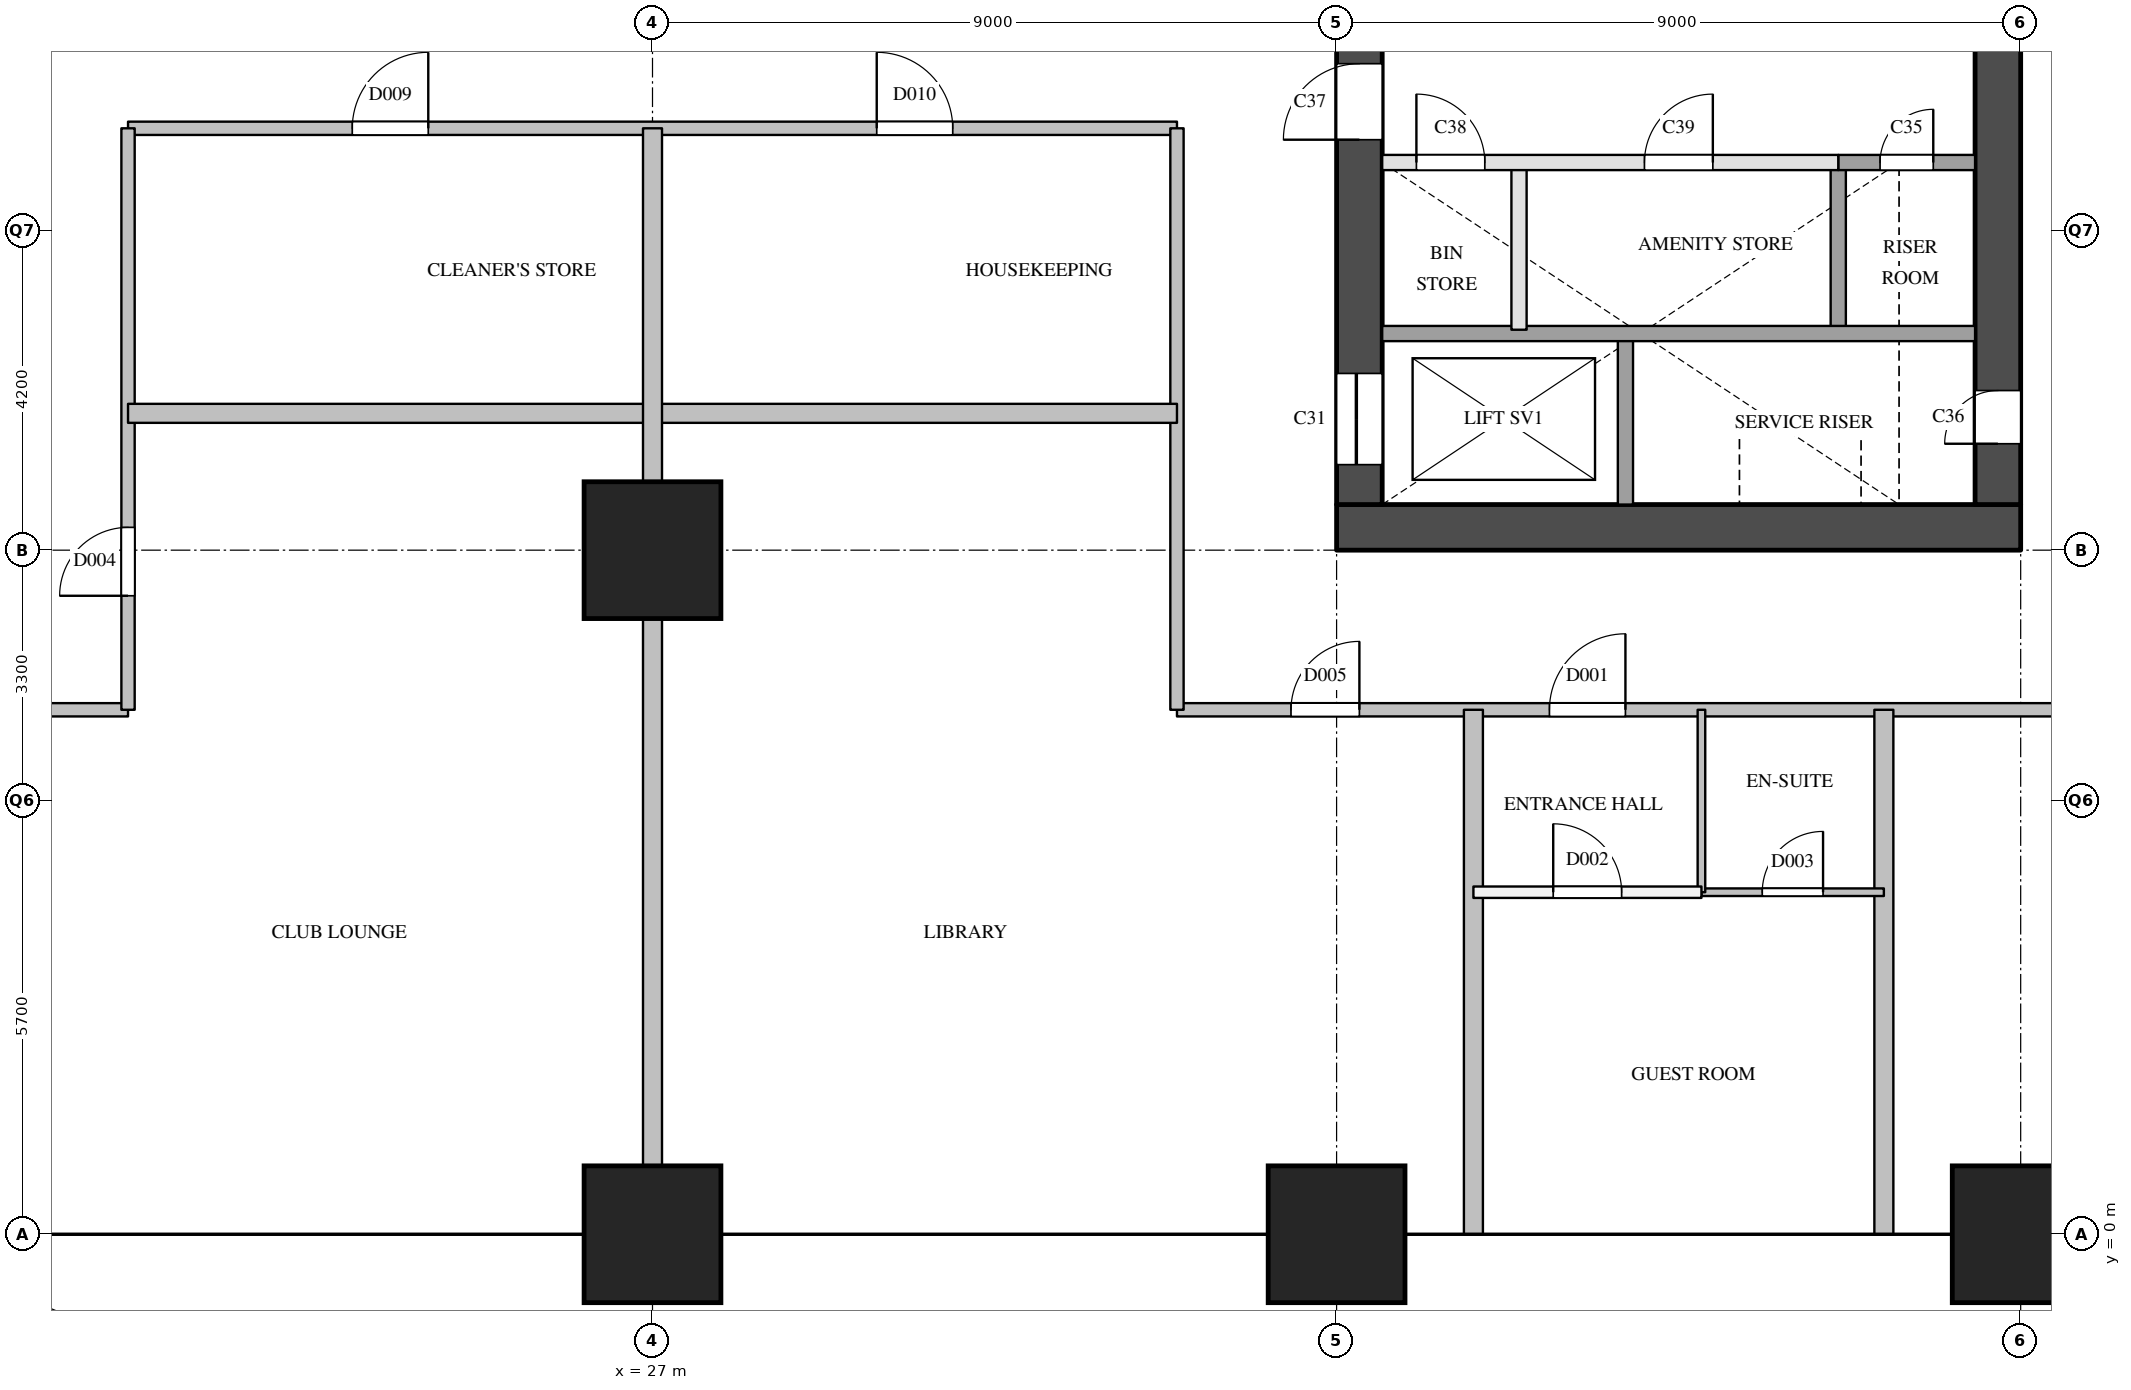
"""IFC4 building model, lengths in metres.
Left out: names, types, materials, properties, quantities, classifications, styles, units other than length and angle.
Written with IfcOpenShell. Run it as: python <this file> out.ifc"""

import sys

from ifc_helpers import new_model, si_unit, direction, frame, frame_2d, origin, origin_2d, place, context, subcontext, project, spatial, rectangle, extrude, element, fill, save


model = new_model("IFC4")
c1 = context("Model", 3, precision=1e-05, world=origin(), true_north=direction((0.0, 1.0)))
c2 = subcontext(c1, "Body", "Model", "MODEL_VIEW")
j1 = project(units=[si_unit("LENGTHUNIT", "METRE"), si_unit("PLANEANGLEUNIT", "RADIAN")], contexts=[c1])
p1 = place(None, origin())
s1 = spatial("IfcSite", under=j1, at=p1, CompositionType="ELEMENT")
p2 = place(p1, origin())
s2 = spatial("IfcBuilding", under=s1, at=p2, CompositionType="ELEMENT")
p3 = place(p2, frame((0.0, 0.0, 53.8)))
s3 = spatial("IfcBuildingStorey", under=s2, at=p3, CompositionType="ELEMENT", Elevation=53.8)
for number, where, z_axis, x_axis in (
    (1, (27.0, 0.0, 0.0), (0.0, 0.0, 1.0), (1.0, 0.0, 0.0)),
    (2, (27.0, 9.0, 0.0), (0.0, 0.0, 1.0), (1.0, 0.0, 0.0)),
    (3, (36.0, 0.0, 0.0), (0.0, 0.0, 1.0), (1.0, 0.0, 0.0)),
    (4, (45.0, 0.0, 0.0), (0.0, 0.0, 1.0), (1.0, 0.0, 0.0)),
):
    element("IfcColumn", number, at=place(p3, frame(where, z_axis=z_axis, x_axis=x_axis)), inside=s3, PredefinedType="COLUMN", context=c2, shape_type="SweptSolid", body=[
        extrude(rectangle(XDim=1.8, YDim=1.8, at=origin_2d()), origin(), (0.0, 0.0, 1.0), 3.8),
    ])
p4 = place(p3, frame((36.0, 9.3, 0.0), z_axis=(0.0, 0.0, 1.0), x_axis=(1.0, 0.0, 0.0)))
e5 = element("IfcWall", 5, at=p4, inside=s3, PredefinedType="SHEAR", context=c2, shape_type="SweptSolid", body=[
    extrude(rectangle(XDim=9.0, YDim=0.6, at=frame_2d((4.5, 0.0))), origin(), (0.0, 0.0, 1.0), 3.5),
])
p5 = place(p3, frame((36.3, 9.6, 0.0), z_axis=(0.0, 0.0, 1.0), x_axis=(0.0, 1.0, 0.0)))
e6 = element("IfcWall", 6, at=p5, inside=s3, PredefinedType="SHEAR", context=c2, shape_type="SweptSolid", body=[
    extrude(rectangle(XDim=12.3, YDim=0.6, at=frame_2d((6.15, 0.0))), origin(), (0.0, 0.0, 1.0), 3.5),
])
p6 = place(p5, frame((0.525, 0.0, 0.0)))
e7 = element("IfcOpeningElement", 7, at=p6, cuts=e6, PredefinedType="OPENING", context=c2, shape_type="SweptSolid", body=[
    extrude(rectangle(XDim=1.2, YDim=2.1, at=frame_2d((0.6, 1.05))), frame((0.0, 0.31, 0.0), z_axis=(0.0, -1.0, 0.0), x_axis=(1.0, 0.0, 0.0)), (0.0, 0.0, 1.0), 0.62),
])
p7 = place(p5, frame((4.8, 0.0, 0.0)))
e8 = element("IfcOpeningElement", 8, at=p7, cuts=e6, PredefinedType="OPENING", context=c2, shape_type="SweptSolid", body=[
    extrude(rectangle(XDim=1.0, YDim=2.1, at=frame_2d((0.5, 1.05))), frame((0.0, 0.31, 0.0), z_axis=(0.0, -1.0, 0.0), x_axis=(1.0, 0.0, 0.0)), (0.0, 0.0, 1.0), 0.62),
])
p8 = place(p3, frame((44.7, 9.6, 0.0), z_axis=(0.0, 0.0, 1.0), x_axis=(0.0, 1.0, 0.0)))
e9 = element("IfcWall", 9, at=p8, inside=s3, PredefinedType="SHEAR", context=c2, shape_type="SweptSolid", body=[
    extrude(rectangle(XDim=12.3, YDim=0.6, at=frame_2d((6.15, 0.0))), origin(), (0.0, 0.0, 1.0), 3.5),
])
p9 = place(p8, frame((0.8, 0.0, 0.0)))
e10 = element("IfcOpeningElement", 10, at=p9, cuts=e9, PredefinedType="OPENING", context=c2, shape_type="SweptSolid", body=[
    extrude(rectangle(XDim=0.7, YDim=2.1, at=frame_2d((0.35, 1.05))), frame((0.0, 0.31, 0.0), z_axis=(0.0, -1.0, 0.0), x_axis=(1.0, 0.0, 0.0)), (0.0, 0.0, 1.0), 0.62),
])
p10 = place(p3, frame((38.4, 11.9, 0.0), z_axis=(0.0, 0.0, 1.0), x_axis=(0.0, 1.0, 0.0)))
e11 = element("IfcWall", 11, at=p10, inside=s3, PredefinedType="PARTITIONING", context=c2, shape_type="SweptSolid", body=[
    extrude(rectangle(XDim=2.2, YDim=0.2, at=frame_2d((1.1, 0.0))), origin(), (0.0, 0.0, 1.0), 3.5),
])
p11 = place(p3, frame((39.8, 9.6, 0.0), z_axis=(0.0, 0.0, 1.0), x_axis=(0.0, 1.0, 0.0)))
e12 = element("IfcWall", 12, at=p11, inside=s3, PredefinedType="SOLIDWALL", context=c2, shape_type="SweptSolid", body=[
    extrude(rectangle(XDim=2.3, YDim=0.2, at=frame_2d((1.15, 0.0))), origin(), (0.0, 0.0, 1.0), 3.5),
])
p12 = place(p3, frame((42.6, 11.9, 0.0), z_axis=(0.0, 0.0, 1.0), x_axis=(0.0, 1.0, 0.0)))
e13 = element("IfcWall", 13, at=p12, inside=s3, PredefinedType="SOLIDWALL", context=c2, shape_type="SweptSolid", body=[
    extrude(rectangle(XDim=2.2, YDim=0.2, at=frame_2d((1.1, 0.0))), origin(), (0.0, 0.0, 1.0), 3.5),
])
p13 = place(p3, frame((36.6, 11.85, 0.0), z_axis=(0.0, 0.0, 1.0), x_axis=(1.0, 0.0, 0.0)))
e14 = element("IfcWall", 14, at=p13, inside=s3, PredefinedType="SOLIDWALL", context=c2, shape_type="SweptSolid", body=[
    extrude(rectangle(XDim=7.8, YDim=0.2, at=frame_2d((3.9, 0.0))), origin(), (0.0, 0.0, 1.0), 3.5),
])
p14 = place(p3, frame((36.6, 14.1, 0.0), z_axis=(0.0, 0.0, 1.0), x_axis=(1.0, 0.0, 0.0)))
e15 = element("IfcWall", 15, at=p14, inside=s3, PredefinedType="PARTITIONING", context=c2, shape_type="SweptSolid", body=[
    extrude(rectangle(XDim=6.0, YDim=0.2, at=frame_2d((3.0, 0.0))), origin(), (0.0, 0.0, 1.0), 3.5),
])
p15 = place(p14, frame((0.45, 0.0, 0.0)))
e16 = element("IfcOpeningElement", 16, at=p15, cuts=e15, PredefinedType="OPENING", context=c2, shape_type="SweptSolid", body=[
    extrude(rectangle(XDim=0.9, YDim=2.1, at=frame_2d((0.45, 1.05))), frame((0.0, 0.11, 0.0), z_axis=(0.0, -1.0, 0.0), x_axis=(1.0, 0.0, 0.0)), (0.0, 0.0, 1.0), 0.22),
])
p16 = place(p14, frame((3.45, 0.0, 0.0)))
e17 = element("IfcOpeningElement", 17, at=p16, cuts=e15, PredefinedType="OPENING", context=c2, shape_type="SweptSolid", body=[
    extrude(rectangle(XDim=0.9, YDim=2.1, at=frame_2d((0.45, 1.05))), frame((0.0, 0.11, 0.0), z_axis=(0.0, -1.0, 0.0), x_axis=(1.0, 0.0, 0.0)), (0.0, 0.0, 1.0), 0.22),
])
p17 = place(p3, frame((42.6, 14.1, 0.0), z_axis=(0.0, 0.0, 1.0), x_axis=(1.0, 0.0, 0.0)))
e18 = element("IfcWall", 18, at=p17, inside=s3, PredefinedType="SOLIDWALL", context=c2, shape_type="SweptSolid", body=[
    extrude(rectangle(XDim=1.8, YDim=0.2, at=frame_2d((0.9, 0.0))), origin(), (0.0, 0.0, 1.0), 3.5),
])
p18 = place(p17, frame((0.55, 0.0, 0.0)))
e19 = element("IfcOpeningElement", 19, at=p18, cuts=e18, PredefinedType="OPENING", context=c2, shape_type="SweptSolid", body=[
    extrude(rectangle(XDim=0.7, YDim=2.1, at=frame_2d((0.35, 1.05))), frame((0.0, 0.11, 0.0), z_axis=(0.0, -1.0, 0.0), x_axis=(1.0, 0.0, 0.0)), (0.0, 0.0, 1.0), 0.22),
])
p19 = place(p3, frame((6.9, 6.9, 0.0), z_axis=(0.0, 0.0, 1.0), x_axis=(1.0, 0.0, 0.0)))
e20 = element("IfcWall", 20, at=p19, inside=s3, PredefinedType="PARTITIONING", context=c2, shape_type="SweptSolid", body=[
    extrude(rectangle(XDim=13.2, YDim=0.175, at=frame_2d((6.6, 0.0))), origin(), (0.0, 0.0, 1.0), 3.5),
])
p20 = place(p19, frame((6.1, 0.0, 0.0)))
e21 = element("IfcOpeningElement", 21, at=p20, cuts=e20, PredefinedType="OPENING", context=c2, shape_type="SweptSolid", body=[
    extrude(rectangle(XDim=1.0, YDim=2.1, at=frame_2d((0.5, 1.05))), frame((0.0, 0.097, 0.0), z_axis=(0.0, -1.0, 0.0), x_axis=(1.0, 0.0, 0.0)), (0.0, 0.0, 1.0), 0.195),
])
p21 = place(p3, frame((33.9, 6.9, 0.0), z_axis=(0.0, 0.0, 1.0), x_axis=(1.0, 0.0, 0.0)))
e22 = element("IfcWall", 22, at=p21, inside=s3, PredefinedType="PARTITIONING", context=c2, shape_type="SweptSolid", body=[
    extrude(rectangle(XDim=13.2, YDim=0.175, at=frame_2d((6.6, 0.0))), origin(), (0.0, 0.0, 1.0), 3.5),
])
p22 = place(p21, frame((4.9, 0.0, 0.0)))
e23 = element("IfcOpeningElement", 23, at=p22, cuts=e22, PredefinedType="OPENING", context=c2, shape_type="SweptSolid", body=[
    extrude(rectangle(XDim=1.0, YDim=2.1, at=frame_2d((0.5, 1.05))), frame((0.0, 0.097, 0.0), z_axis=(0.0, -1.0, 0.0), x_axis=(1.0, 0.0, 0.0)), (0.0, 0.0, 1.0), 0.195),
])
p23 = place(p21, frame((1.5, 0.0, 0.0)))
e24 = element("IfcOpeningElement", 24, at=p23, cuts=e22, PredefinedType="OPENING", context=c2, shape_type="SweptSolid", body=[
    extrude(rectangle(XDim=0.9, YDim=2.1, at=frame_2d((0.45, 1.05))), frame((0.0, 0.097, 0.0), z_axis=(0.0, -1.0, 0.0), x_axis=(1.0, 0.0, 0.0)), (0.0, 0.0, 1.0), 0.195),
])
p24 = place(p3, frame((20.1, 14.55, 0.0), z_axis=(0.0, 0.0, 1.0), x_axis=(1.0, 0.0, 0.0)))
e25 = element("IfcWall", 25, at=p24, inside=s3, PredefinedType="PARTITIONING", context=c2, shape_type="SweptSolid", body=[
    extrude(rectangle(XDim=13.8, YDim=0.175, at=frame_2d((6.9, 0.0))), origin(), (0.0, 0.0, 1.0), 2.5),
])
p25 = place(p24, frame((2.95, 0.0, 0.0)))
e26 = element("IfcOpeningElement", 26, at=p25, cuts=e25, PredefinedType="OPENING", context=c2, shape_type="SweptSolid", body=[
    extrude(rectangle(XDim=1.0, YDim=2.1, at=frame_2d((0.5, 1.05))), frame((0.0, 0.097, 0.0), z_axis=(0.0, -1.0, 0.0), x_axis=(1.0, 0.0, 0.0)), (0.0, 0.0, 1.0), 0.195),
])
p26 = place(p24, frame((9.85, 0.0, 0.0)))
e27 = element("IfcOpeningElement", 27, at=p26, cuts=e25, PredefinedType="OPENING", context=c2, shape_type="SweptSolid", body=[
    extrude(rectangle(XDim=1.0, YDim=2.1, at=frame_2d((0.5, 1.05))), frame((0.0, 0.097, 0.0), z_axis=(0.0, -1.0, 0.0), x_axis=(1.0, 0.0, 0.0)), (0.0, 0.0, 1.0), 0.195),
])
p27 = place(p3, frame((20.1, 6.9, 0.0), z_axis=(0.0, 0.0, 1.0), x_axis=(0.0, 1.0, 0.0)))
e28 = element("IfcWall", 28, at=p27, inside=s3, PredefinedType="PARTITIONING", context=c2, shape_type="SweptSolid", body=[
    extrude(rectangle(XDim=7.65, YDim=0.175, at=frame_2d((3.825, 0.0))), origin(), (0.0, 0.0, 1.0), 3.5),
])
p28 = place(p27, frame((1.5, 0.0, 0.0)))
e29 = element("IfcOpeningElement", 29, at=p28, cuts=e28, PredefinedType="OPENING", context=c2, shape_type="SweptSolid", body=[
    extrude(rectangle(XDim=0.9, YDim=2.1, at=frame_2d((0.45, 1.05))), frame((0.0, 0.097, 0.0), z_axis=(0.0, -1.0, 0.0), x_axis=(1.0, 0.0, 0.0)), (0.0, 0.0, 1.0), 0.195),
])
p29 = place(p3, frame((33.9, 6.9, 0.0), z_axis=(0.0, 0.0, 1.0), x_axis=(0.0, 1.0, 0.0)))
e30 = element("IfcWall", 30, at=p29, inside=s3, PredefinedType="PARTITIONING", context=c2, shape_type="SweptSolid", body=[
    extrude(rectangle(XDim=7.65, YDim=0.175, at=frame_2d((3.825, 0.0))), origin(), (0.0, 0.0, 1.0), 3.5),
])
p30 = place(p3, frame((37.8, 4.5, 0.0), z_axis=(0.0, 0.0, 1.0), x_axis=(1.0, 0.0, 0.0)))
e31 = element("IfcWall", 31, at=p30, inside=s3, PredefinedType="PARTITIONING", context=c2, shape_type="SweptSolid", body=[
    extrude(rectangle(XDim=3.0, YDim=0.15, at=frame_2d((1.5, 0.0))), origin(), (0.0, 0.0, 1.0), 3.5),
])
p31 = place(p30, frame((1.05, 0.0, 0.0)))
e32 = element("IfcOpeningElement", 32, at=p31, cuts=e31, PredefinedType="OPENING", context=c2, shape_type="SweptSolid", body=[
    extrude(rectangle(XDim=0.9, YDim=2.1, at=frame_2d((0.45, 1.05))), frame((0.0, 0.085, 0.0), z_axis=(0.0, -1.0, 0.0), x_axis=(1.0, 0.0, 0.0)), (0.0, 0.0, 1.0), 0.17),
])
p32 = place(p3, frame((20.1, 10.8, 0.0), z_axis=(0.0, 0.0, 1.0), x_axis=(1.0, 0.0, 0.0)))
e33 = element("IfcWall", 33, at=p32, inside=s3, PredefinedType="PARTITIONING", context=c2, shape_type="SweptSolid", body=[
    extrude(rectangle(XDim=13.8, YDim=0.25, at=frame_2d((6.9, 0.0))), origin(), (0.0, 0.0, 1.0), 2.5),
])
p33 = place(p3, frame((27.0, 0.0, 0.0), z_axis=(0.0, 0.0, 1.0), x_axis=(0.0, 1.0, 0.0)))
e34 = element("IfcWall", 34, at=p33, inside=s3, PredefinedType="PARTITIONING", context=c2, shape_type="SweptSolid", body=[
    extrude(rectangle(XDim=14.55, YDim=0.25, at=frame_2d((7.275, 0.0))), origin(), (0.0, 0.0, 1.0), 2.5),
])
for number, where, z_axis, x_axis in (
    (35, (37.8, 0.0, 0.0), (0.0, 0.0, 1.0), (0.0, 1.0, 0.0)),
    (36, (43.2, 0.0, 0.0), (0.0, 0.0, 1.0), (0.0, 1.0, 0.0)),
):
    element("IfcWall", number, at=place(p3, frame(where, z_axis=z_axis, x_axis=x_axis)), inside=s3, PredefinedType="PARTITIONING", context=c2, shape_type="SweptSolid", body=[
        extrude(rectangle(XDim=6.9, YDim=0.25, at=frame_2d((3.45, 0.0))), origin(), (0.0, 0.0, 1.0), 2.5),
    ])
p34 = place(p3, frame((40.8, 4.5, 0.0), z_axis=(0.0, 0.0, 1.0), x_axis=(1.0, 0.0, 0.0)))
e37 = element("IfcWall", 37, at=p34, inside=s3, PredefinedType="PARTITIONING", context=c2, shape_type="SweptSolid", body=[
    extrude(rectangle(XDim=2.4, YDim=0.1, at=frame_2d((1.2, 0.0))), origin(), (0.0, 0.0, 1.0), 3.5),
])
p35 = place(p34, frame((0.8, 0.0, 0.0)))
e38 = element("IfcOpeningElement", 38, at=p35, cuts=e37, PredefinedType="OPENING", context=c2, shape_type="SweptSolid", body=[
    extrude(rectangle(XDim=0.8, YDim=2.1, at=frame_2d((0.4, 1.05))), frame((0.0, 0.06, 0.0), z_axis=(0.0, -1.0, 0.0), x_axis=(1.0, 0.0, 0.0)), (0.0, 0.0, 1.0), 0.12),
])
p36 = place(p3, frame((40.8, 4.5, 0.0), z_axis=(0.0, 0.0, 1.0), x_axis=(0.0, 1.0, 0.0)))
e39 = element("IfcWall", 39, at=p36, inside=s3, PredefinedType="PARTITIONING", context=c2, shape_type="SweptSolid", body=[
    extrude(rectangle(XDim=2.4, YDim=0.1, at=frame_2d((1.2, 0.0))), origin(), (0.0, 0.0, 1.0), 3.5),
])
p37 = place(p6, origin())
e40 = element("IfcDoor", 40, at=p37, inside=s3, OperationType="SLIDING_TO_LEFT", PredefinedType="DOOR", context=c2, shape_type="SweptSolid", body=[
    extrude(rectangle(XDim=1.2, YDim=2.1, at=frame_2d((0.6, 1.05))), frame((0.0, 0.025, 0.0), z_axis=(0.0, -1.0, 0.0), x_axis=(1.0, 0.0, 0.0)), (0.0, 0.0, 1.0), 0.05),
])
fill(e7, e40)
p38 = place(p18, origin())
e41 = element("IfcDoor", 41, at=p38, inside=s3, OperationType="SINGLE_SWING_RIGHT", PredefinedType="DOOR", context=c2, shape_type="SweptSolid", body=[
    extrude(rectangle(XDim=0.7, YDim=2.1, at=frame_2d((0.35, 1.05))), frame((0.0, 0.025, 0.0), z_axis=(0.0, -1.0, 0.0), x_axis=(1.0, 0.0, 0.0)), (0.0, 0.0, 1.0), 0.05),
])
fill(e19, e41)
p39 = place(p9, origin())
e42 = element("IfcDoor", 42, at=p39, inside=s3, OperationType="SINGLE_SWING_LEFT", PredefinedType="DOOR", context=c2, shape_type="SweptSolid", body=[
    extrude(rectangle(XDim=0.7, YDim=2.1, at=frame_2d((0.35, 1.05))), frame((0.0, 0.025, 0.0), z_axis=(0.0, -1.0, 0.0), x_axis=(1.0, 0.0, 0.0)), (0.0, 0.0, 1.0), 0.05),
])
fill(e10, e42)
p40 = place(p7, origin())
e43 = element("IfcDoor", 43, at=p40, inside=s3, OperationType="SINGLE_SWING_LEFT", PredefinedType="DOOR", context=c2, shape_type="SweptSolid", body=[
    extrude(rectangle(XDim=1.0, YDim=2.1, at=frame_2d((0.5, 1.05))), frame((0.0, 0.025, 0.0), z_axis=(0.0, -1.0, 0.0), x_axis=(1.0, 0.0, 0.0)), (0.0, 0.0, 1.0), 0.05),
])
fill(e8, e43)
p41 = place(p15, origin())
e44 = element("IfcDoor", 44, at=p41, inside=s3, OperationType="SINGLE_SWING_LEFT", PredefinedType="DOOR", context=c2, shape_type="SweptSolid", body=[
    extrude(rectangle(XDim=0.9, YDim=2.1, at=frame_2d((0.45, 1.05))), frame((0.0, 0.025, 0.0), z_axis=(0.0, -1.0, 0.0), x_axis=(1.0, 0.0, 0.0)), (0.0, 0.0, 1.0), 0.05),
])
fill(e16, e44)
p42 = place(p16, origin())
e45 = element("IfcDoor", 45, at=p42, inside=s3, OperationType="SINGLE_SWING_RIGHT", PredefinedType="DOOR", context=c2, shape_type="SweptSolid", body=[
    extrude(rectangle(XDim=0.9, YDim=2.1, at=frame_2d((0.45, 1.05))), frame((0.0, 0.025, 0.0), z_axis=(0.0, -1.0, 0.0), x_axis=(1.0, 0.0, 0.0)), (0.0, 0.0, 1.0), 0.05),
])
fill(e17, e45)
p43 = place(p22, origin())
e46 = element("IfcDoor", 46, at=p43, inside=s3, OperationType="SINGLE_SWING_RIGHT", PredefinedType="DOOR", context=c2, shape_type="SweptSolid", body=[
    extrude(rectangle(XDim=1.0, YDim=2.1, at=frame_2d((0.5, 1.05))), frame((0.0, 0.025, 0.0), z_axis=(0.0, -1.0, 0.0), x_axis=(1.0, 0.0, 0.0)), (0.0, 0.0, 1.0), 0.05),
])
fill(e23, e46)
p44 = place(p31, origin())
e47 = element("IfcDoor", 47, at=p44, inside=s3, OperationType="SINGLE_SWING_LEFT", PredefinedType="DOOR", context=c2, shape_type="SweptSolid", body=[
    extrude(rectangle(XDim=0.9, YDim=2.1, at=frame_2d((0.45, 1.05))), frame((0.0, 0.025, 0.0), z_axis=(0.0, -1.0, 0.0), x_axis=(1.0, 0.0, 0.0)), (0.0, 0.0, 1.0), 0.05),
])
fill(e32, e47)
p45 = place(p35, origin())
e48 = element("IfcDoor", 48, at=p45, inside=s3, OperationType="SINGLE_SWING_RIGHT", PredefinedType="DOOR", context=c2, shape_type="SweptSolid", body=[
    extrude(rectangle(XDim=0.8, YDim=2.1, at=frame_2d((0.4, 1.05))), frame((0.0, 0.025, 0.0), z_axis=(0.0, -1.0, 0.0), x_axis=(1.0, 0.0, 0.0)), (0.0, 0.0, 1.0), 0.05),
])
fill(e38, e48)
p46 = place(p28, origin())
e49 = element("IfcDoor", 49, at=p46, inside=s3, OperationType="SINGLE_SWING_LEFT", PredefinedType="DOOR", context=c2, shape_type="SweptSolid", body=[
    extrude(rectangle(XDim=0.9, YDim=2.1, at=frame_2d((0.45, 1.05))), frame((0.0, 0.025, 0.0), z_axis=(0.0, -1.0, 0.0), x_axis=(1.0, 0.0, 0.0)), (0.0, 0.0, 1.0), 0.05),
])
fill(e29, e49)
p47 = place(p23, origin())
e50 = element("IfcDoor", 50, at=p47, inside=s3, OperationType="SINGLE_SWING_RIGHT", PredefinedType="DOOR", context=c2, shape_type="SweptSolid", body=[
    extrude(rectangle(XDim=0.9, YDim=2.1, at=frame_2d((0.45, 1.05))), frame((0.0, 0.025, 0.0), z_axis=(0.0, -1.0, 0.0), x_axis=(1.0, 0.0, 0.0)), (0.0, 0.0, 1.0), 0.05),
])
fill(e24, e50)
p48 = place(p25, origin())
e51 = element("IfcDoor", 51, at=p48, inside=s3, OperationType="SINGLE_SWING_RIGHT", PredefinedType="DOOR", context=c2, shape_type="SweptSolid", body=[
    extrude(rectangle(XDim=1.0, YDim=2.1, at=frame_2d((0.5, 1.05))), frame((0.0, 0.025, 0.0), z_axis=(0.0, -1.0, 0.0), x_axis=(1.0, 0.0, 0.0)), (0.0, 0.0, 1.0), 0.05),
])
fill(e26, e51)
p49 = place(p26, origin())
e52 = element("IfcDoor", 52, at=p49, inside=s3, OperationType="SINGLE_SWING_LEFT", PredefinedType="DOOR", context=c2, shape_type="SweptSolid", body=[
    extrude(rectangle(XDim=1.0, YDim=2.1, at=frame_2d((0.5, 1.05))), frame((0.0, 0.025, 0.0), z_axis=(0.0, -1.0, 0.0), x_axis=(1.0, 0.0, 0.0)), (0.0, 0.0, 1.0), 0.05),
])
fill(e27, e52)
save(model, sys.argv[1])
